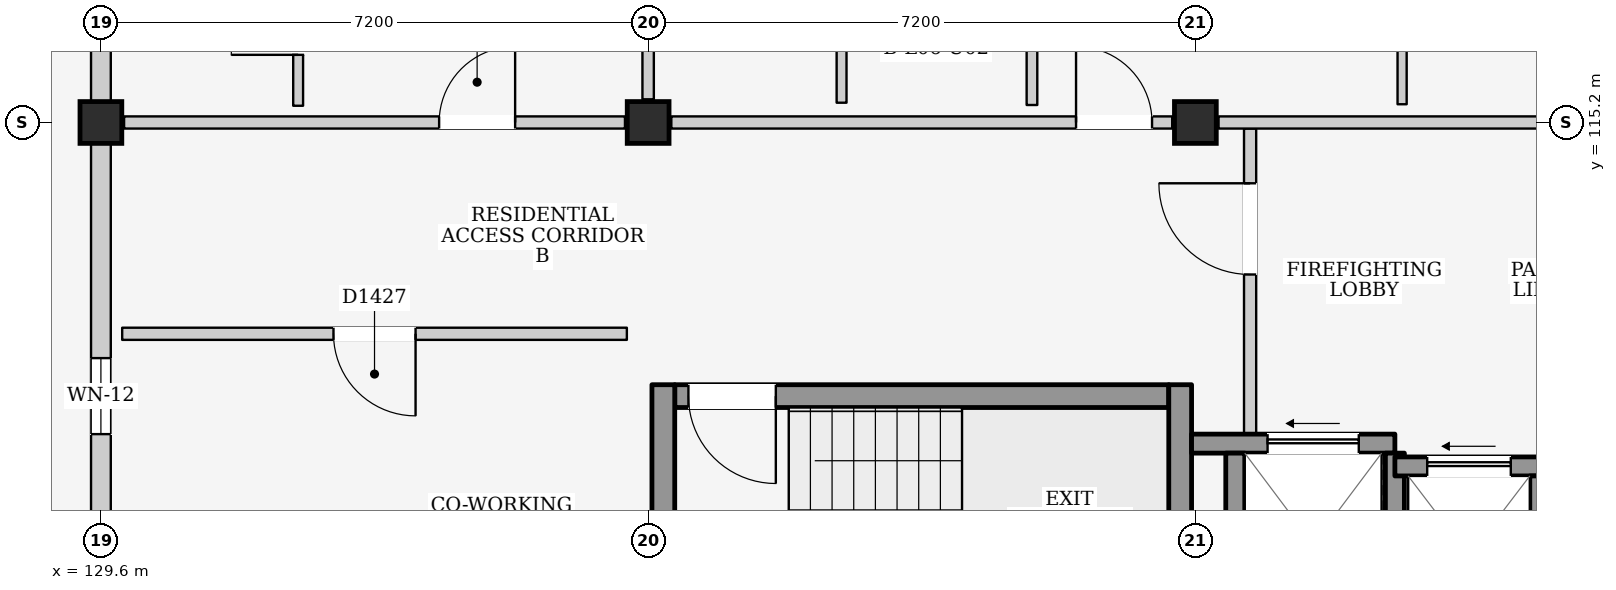
"""IFC4 building model, lengths in metres.
Left out: names, types, materials, properties, quantities, classifications, styles, units other than length and angle.
Written with IfcOpenShell. Run it as: python <this file> out.ifc"""

import sys

from ifc_helpers import new_model, si_unit, direction, frame, frame_2d, origin, origin_2d, place, context, subcontext, project, spatial, rectangle, extrude, element, fill, save


model = new_model("IFC4")
c1 = context("Model", 3, precision=1e-05, world=origin(), true_north=direction((0.0, 1.0)))
c2 = subcontext(c1, "Body", "Model", "MODEL_VIEW")
j1 = project(units=[si_unit("LENGTHUNIT", "METRE"), si_unit("PLANEANGLEUNIT", "RADIAN")], contexts=[c1])
p1 = place(None, origin())
s1 = spatial("IfcSite", under=j1, at=p1, CompositionType="ELEMENT")
p2 = place(p1, origin())
s2 = spatial("IfcBuilding", under=s1, at=p2, CompositionType="ELEMENT")
p3 = place(p2, frame((0.0, 0.0, 21.9)))
s3 = spatial("IfcBuildingStorey", under=s2, at=p3, CompositionType="ELEMENT", Elevation=21.9)
for number, where, z_axis, x_axis in (
    (1, (129.6, 115.2, 0.0), (0.0, 0.0, 1.0), (1.0, 0.0, 0.0)),
    (2, (136.8, 115.2, 0.0), (0.0, 0.0, 1.0), (1.0, 0.0, 0.0)),
    (3, (144.0, 115.2, 0.0), (0.0, 0.0, 1.0), (1.0, 0.0, 0.0)),
):
    element("IfcColumn", number, at=place(p3, frame(where, z_axis=z_axis, x_axis=x_axis)), inside=s3, PredefinedType="COLUMN", context=c2, shape_type="SweptSolid", body=[
        extrude(rectangle(XDim=0.55, YDim=0.55, at=origin_2d()), origin(), (0.0, 0.0, 1.0), 3.2),
    ])
p4 = place(p3, frame((129.6, 108.275, 0.0), z_axis=(0.0, 0.0, 1.0), x_axis=(0.0, 1.0, 0.0)))
e4 = element("IfcWall", 4, at=p4, inside=s3, PredefinedType="ELEMENTEDWALL", context=c2, shape_type="SweptSolid", body=[
    extrude(rectangle(XDim=6.65, YDim=0.26, at=frame_2d((3.325, 0.0))), origin(), (0.0, 0.0, 1.0), 2.465),
])
p5 = place(p4, frame((2.825, 0.0, 1.1)))
e5 = element("IfcOpeningElement", 5, at=p5, cuts=e4, PredefinedType="OPENING", context=c2, shape_type="SweptSolid", body=[
    extrude(rectangle(XDim=1.0, YDim=0.9, at=frame_2d((0.5, 0.45))), frame((0.0, 0.145, 0.0), z_axis=(0.0, -1.0, 0.0), x_axis=(1.0, 0.0, 0.0)), (0.0, 0.0, 1.0), 0.29),
])
p6 = place(p3, frame((129.6, 115.475, 0.0), z_axis=(0.0, 0.0, 1.0), x_axis=(0.0, 1.0, 0.0)))
e6 = element("IfcWall", 6, at=p6, inside=s3, PredefinedType="ELEMENTEDWALL", context=c2, shape_type="SweptSolid", body=[
    extrude(rectangle(XDim=6.65, YDim=0.26, at=frame_2d((3.325, 0.0))), origin(), (0.0, 0.0, 1.0), 2.465),
])
p7 = place(p6, frame((3.6, 0.0, 0.0)))
e7 = element("IfcOpeningElement", 7, at=p7, cuts=e6, PredefinedType="OPENING", context=c2, shape_type="SweptSolid", body=[
    extrude(rectangle(XDim=1.08, YDim=2.12, at=frame_2d((0.54, 1.06))), frame((0.0, 0.145, 0.0), z_axis=(0.0, -1.0, 0.0), x_axis=(1.0, 0.0, 0.0)), (0.0, 0.0, 1.0), 0.29),
])
p8 = place(p6, frame((0.9, 0.0, 0.95)))
e8 = element("IfcOpeningElement", 8, at=p8, cuts=e6, PredefinedType="OPENING", context=c2, shape_type="SweptSolid", body=[
    extrude(rectangle(XDim=1.2, YDim=1.35, at=frame_2d((0.6, 0.675))), frame((0.0, 0.145, 0.0), z_axis=(0.0, -1.0, 0.0), x_axis=(1.0, 0.0, 0.0)), (0.0, 0.0, 1.0), 0.29),
])
p9 = place(p3, frame((137.15, 111.6, 0.0), z_axis=(0.0, 0.0, 1.0), x_axis=(1.0, 0.0, 0.0)))
e9 = element("IfcWall", 9, at=p9, inside=s3, PredefinedType="SHEAR", context=c2, shape_type="SweptSolid", body=[
    extrude(rectangle(XDim=6.5, YDim=0.3, at=frame_2d((3.25, 0.0))), origin(), (0.0, 0.0, 1.0), 2.98),
])
p10 = place(p9, frame((0.18, 0.0, 0.0)))
e10 = element("IfcOpeningElement", 10, at=p10, cuts=e9, PredefinedType="OPENING", context=c2, shape_type="SweptSolid", body=[
    extrude(rectangle(XDim=1.15, YDim=2.2, at=frame_2d((0.575, 1.1))), frame((0.0, 0.165, 0.0), z_axis=(0.0, -1.0, 0.0), x_axis=(1.0, 0.0, 0.0)), (0.0, 0.0, 1.0), 0.33),
])
for number, where, z_axis, x_axis in (
    (11, (137.0, 108.15, 0.0), (0.0, 0.0, 1.0), (0.0, 1.0, 0.0)),
    (12, (143.8, 108.15, 0.0), (0.0, 0.0, 1.0), (0.0, 1.0, 0.0)),
):
    element("IfcWall", number, at=place(p3, frame(where, z_axis=z_axis, x_axis=x_axis)), inside=s3, PredefinedType="SHEAR", context=c2, shape_type="SweptSolid", body=[
        extrude(rectangle(XDim=3.6, YDim=0.3, at=frame_2d((1.8, 0.0))), origin(), (0.0, 0.0, 1.0), 2.98),
    ])
p11 = place(p3, frame((144.72, 111.1, 0.0), z_axis=(0.0, 0.0, 1.0), x_axis=(0.0, 1.0, 0.0)))
e13 = element("IfcWall", 13, at=p11, inside=s3, PredefinedType="PARTITIONING", context=c2, shape_type="SweptSolid", body=[
    extrude(rectangle(XDim=4.02, YDim=0.16, at=frame_2d((2.01, 0.0))), origin(), (0.0, 0.0, 1.0), 2.98),
])
p12 = place(p11, frame((2.1, 0.0, 0.0)))
e14 = element("IfcOpeningElement", 14, at=p12, cuts=e13, PredefinedType="OPENING", context=c2, shape_type="SweptSolid", body=[
    extrude(rectangle(XDim=1.2, YDim=2.2, at=frame_2d((0.6, 1.1))), frame((0.0, 0.095, 0.0), z_axis=(0.0, -1.0, 0.0), x_axis=(1.0, 0.0, 0.0)), (0.0, 0.0, 1.0), 0.19),
])
p13 = place(p3, frame((143.95, 110.975, 0.0), z_axis=(0.0, 0.0, 1.0), x_axis=(1.0, 0.0, 0.0)))
e15 = element("IfcWall", 15, at=p13, inside=s3, PredefinedType="SHEAR", context=c2, shape_type="SweptSolid", body=[
    extrude(rectangle(XDim=2.675, YDim=0.25, at=frame_2d((1.337, 0.0))), origin(), (0.0, 0.0, 1.0), 2.98),
])
p14 = place(p13, frame((1.0, 0.0, 0.0)))
e16 = element("IfcOpeningElement", 16, at=p14, cuts=e15, PredefinedType="OPENING", context=c2, shape_type="SweptSolid", body=[
    extrude(rectangle(XDim=1.2, YDim=2.25, at=frame_2d((0.6, 1.125))), frame((0.0, 0.14, 0.0), z_axis=(0.0, -1.0, 0.0), x_axis=(1.0, 0.0, 0.0)), (0.0, 0.0, 1.0), 0.28),
])
for number, where, z_axis, x_axis in (
    (17, (144.525, 108.45, 0.0), (0.0, 0.0, 1.0), (0.0, 1.0, 0.0)),
    (18, (146.625, 108.45, 0.0), (0.0, 0.0, 1.0), (0.0, 1.0, 0.0)),
):
    element("IfcWall", number, at=place(p3, frame(where, z_axis=z_axis, x_axis=x_axis)), inside=s3, PredefinedType="SHEAR", context=c2, shape_type="SweptSolid", body=[
        extrude(rectangle(XDim=2.4, YDim=0.25, at=frame_2d((1.2, 0.0))), origin(), (0.0, 0.0, 1.0), 2.98),
    ])
p15 = place(p3, frame((146.625, 110.675, 0.0), z_axis=(0.0, 0.0, 1.0), x_axis=(1.0, 0.0, 0.0)))
e19 = element("IfcWall", 19, at=p15, inside=s3, PredefinedType="SHEAR", context=c2, shape_type="SweptSolid", body=[
    extrude(rectangle(XDim=2.025, YDim=0.25, at=frame_2d((1.012, 0.0))), origin(), (0.0, 0.0, 1.0), 2.98),
])
p16 = place(p15, frame((0.425, 0.0, 0.0)))
e20 = element("IfcOpeningElement", 20, at=p16, cuts=e19, PredefinedType="OPENING", context=c2, shape_type="SweptSolid", body=[
    extrude(rectangle(XDim=1.1, YDim=2.15, at=frame_2d((0.55, 1.075))), frame((0.0, 0.14, 0.0), z_axis=(0.0, -1.0, 0.0), x_axis=(1.0, 0.0, 0.0)), (0.0, 0.0, 1.0), 0.28),
])
p17 = place(p3, frame((148.525, 108.45, 0.0), z_axis=(0.0, 0.0, 1.0), x_axis=(0.0, 1.0, 0.0)))
e21 = element("IfcWall", 21, at=p17, inside=s3, PredefinedType="SHEAR", context=c2, shape_type="SweptSolid", body=[
    extrude(rectangle(XDim=2.1, YDim=0.25, at=frame_2d((1.05, 0.0))), origin(), (0.0, 0.0, 1.0), 2.98),
])
p18 = place(p3, frame((129.905, 115.2, 0.0), z_axis=(0.0, 0.0, 1.0), x_axis=(1.0, 0.0, 0.0)))
e22 = element("IfcWall", 22, at=p18, inside=s3, PredefinedType="PARTITIONING", context=c2, shape_type="SweptSolid", body=[
    extrude(rectangle(XDim=6.59, YDim=0.16, at=frame_2d((3.295, 0.0))), origin(), (0.0, 0.0, 1.0), 2.365),
])
p19 = place(p18, frame((4.145, 0.0, 0.0)))
e23 = element("IfcOpeningElement", 23, at=p19, cuts=e22, PredefinedType="OPENING", context=c2, shape_type="SweptSolid", body=[
    extrude(rectangle(XDim=1.0, YDim=2.15, at=frame_2d((0.5, 1.075))), frame((0.0, 0.095, 0.0), z_axis=(0.0, -1.0, 0.0), x_axis=(1.0, 0.0, 0.0)), (0.0, 0.0, 1.0), 0.19),
])
p20 = place(p3, frame((136.8, 115.505, 0.0), z_axis=(0.0, 0.0, 1.0), x_axis=(0.0, 1.0, 0.0)))
e24 = element("IfcWall", 24, at=p20, inside=s3, PredefinedType="PARTITIONING", context=c2, shape_type="SweptSolid", body=[
    extrude(rectangle(XDim=6.59, YDim=0.15, at=frame_2d((3.295, 0.0))), origin(), (0.0, 0.0, 1.0), 2.465),
])
p21 = place(p3, frame((132.195, 115.42, 0.0), z_axis=(0.0, 0.0, 1.0), x_axis=(0.0, 1.0, 0.0)))
e25 = element("IfcWall", 25, at=p21, inside=s3, PredefinedType="PARTITIONING", context=c2, shape_type="SweptSolid", body=[
    extrude(rectangle(XDim=2.22, YDim=0.13, at=frame_2d((1.11, 0.0))), origin(), (0.0, 0.0, 1.0), 2.98),
])
p22 = place(p21, frame((0.67, 0.0, 0.0)))
e26 = element("IfcOpeningElement", 26, at=p22, cuts=e25, PredefinedType="OPENING", context=c2, shape_type="SweptSolid", body=[
    extrude(rectangle(XDim=0.88, YDim=2.1, at=frame_2d((0.44, 1.05))), frame((0.0, 0.08, 0.0), z_axis=(0.0, -1.0, 0.0), x_axis=(1.0, 0.0, 0.0)), (0.0, 0.0, 1.0), 0.16),
])
p23 = place(p3, frame((137.105, 115.2, 0.0), z_axis=(0.0, 0.0, 1.0), x_axis=(1.0, 0.0, 0.0)))
e27 = element("IfcWall", 27, at=p23, inside=s3, PredefinedType="PARTITIONING", context=c2, shape_type="SweptSolid", body=[
    extrude(rectangle(XDim=6.59, YDim=0.16, at=frame_2d((3.295, 0.0))), origin(), (0.0, 0.0, 1.0), 2.365),
])
p24 = place(p23, frame((5.325, 0.0, 0.0)))
e28 = element("IfcOpeningElement", 28, at=p24, cuts=e27, PredefinedType="OPENING", context=c2, shape_type="SweptSolid", body=[
    extrude(rectangle(XDim=1.0, YDim=2.15, at=frame_2d((0.5, 1.075))), frame((0.0, 0.095, 0.0), z_axis=(0.0, -1.0, 0.0), x_axis=(1.0, 0.0, 0.0)), (0.0, 0.0, 1.0), 0.19),
])
p25 = place(p3, frame((144.305, 115.2, 0.0), z_axis=(0.0, 0.0, 1.0), x_axis=(1.0, 0.0, 0.0)))
e29 = element("IfcWall", 29, at=p25, inside=s3, PredefinedType="PARTITIONING", context=c2, shape_type="SweptSolid", body=[
    extrude(rectangle(XDim=6.59, YDim=0.16, at=frame_2d((3.295, 0.0))), origin(), (0.0, 0.0, 1.0), 2.365),
])
p26 = place(p3, frame((139.345, 115.46, 0.0), z_axis=(0.0, 0.0, 1.0), x_axis=(0.0, 1.0, 0.0)))
e30 = element("IfcWall", 30, at=p26, inside=s3, PredefinedType="PARTITIONING", context=c2, shape_type="SweptSolid", body=[
    extrude(rectangle(XDim=3.04, YDim=0.13, at=frame_2d((1.52, 0.0))), origin(), (0.0, 0.0, 1.0), 2.98),
])
p27 = place(p3, frame((141.85, 115.43, 0.0), z_axis=(0.0, 0.0, 1.0), x_axis=(0.0, 1.0, 0.0)))
e31 = element("IfcWall", 31, at=p27, inside=s3, PredefinedType="PARTITIONING", context=c2, shape_type="SweptSolid", body=[
    extrude(rectangle(XDim=3.06, YDim=0.14, at=frame_2d((1.53, 0.0))), origin(), (0.0, 0.0, 1.0), 2.98),
])
p28 = place(p3, frame((146.72, 115.44, 0.0), z_axis=(0.0, 0.0, 1.0), x_axis=(0.0, 1.0, 0.0)))
e32 = element("IfcWall", 32, at=p28, inside=s3, PredefinedType="PARTITIONING", context=c2, shape_type="SweptSolid", body=[
    extrude(rectangle(XDim=3.04, YDim=0.12, at=frame_2d((1.52, 0.0))), origin(), (0.0, 0.0, 1.0), 2.98),
])
p29 = place(p28, frame((1.04, 0.0, 0.0)))
e33 = element("IfcOpeningElement", 33, at=p29, cuts=e32, PredefinedType="OPENING", context=c2, shape_type="SweptSolid", body=[
    extrude(rectangle(XDim=0.96, YDim=2.15, at=frame_2d((0.48, 1.075))), frame((0.0, 0.075, 0.0), z_axis=(0.0, -1.0, 0.0), x_axis=(1.0, 0.0, 0.0)), (0.0, 0.0, 1.0), 0.15),
])
p30 = place(p3, frame((129.88, 112.42, 0.0), z_axis=(0.0, 0.0, 1.0), x_axis=(1.0, 0.0, 0.0)))
e34 = element("IfcWall", 34, at=p30, inside=s3, PredefinedType="PARTITIONING", context=c2, shape_type="SweptSolid", body=[
    extrude(rectangle(XDim=6.64, YDim=0.16, at=frame_2d((3.32, 0.0))), origin(), (0.0, 0.0, 1.0), 2.98),
])
p31 = place(p30, frame((2.78, 0.0, 0.0)))
e35 = element("IfcOpeningElement", 35, at=p31, cuts=e34, PredefinedType="OPENING", context=c2, shape_type="SweptSolid", body=[
    extrude(rectangle(XDim=1.08, YDim=2.22, at=frame_2d((0.54, 1.11))), frame((0.0, 0.095, 0.0), z_axis=(0.0, -1.0, 0.0), x_axis=(1.0, 0.0, 0.0)), (0.0, 0.0, 1.0), 0.19),
])
p32 = place(p5, origin())
e36 = element("IfcWindow", 36, at=p32, inside=s3, PartitioningType="SINGLE_PANEL", PredefinedType="WINDOW", context=c2, shape_type="SweptSolid", body=[
    extrude(rectangle(XDim=1.0, YDim=0.9, at=frame_2d((0.5, 0.45))), frame((0.0, 0.03, 0.0), z_axis=(0.0, -1.0, 0.0), x_axis=(1.0, 0.0, 0.0)), (0.0, 0.0, 1.0), 0.06),
])
fill(e5, e36)
p33 = place(p10, frame((1.15, 0.0, 0.0), z_axis=(0.0, 0.0, 1.0), x_axis=(-1.0, 0.0, 0.0)))
e37 = element("IfcDoor", 37, at=p33, inside=s3, OperationType="SINGLE_SWING_LEFT", PredefinedType="DOOR", context=c2, shape_type="SweptSolid", body=[
    extrude(rectangle(XDim=1.15, YDim=2.2, at=frame_2d((0.575, 1.1))), frame((0.0, 0.025, 0.0), z_axis=(0.0, -1.0, 0.0), x_axis=(1.0, 0.0, 0.0)), (0.0, 0.0, 1.0), 0.05),
])
fill(e10, e37)
p34 = place(p12, origin())
e38 = element("IfcDoor", 38, at=p34, inside=s3, OperationType="SINGLE_SWING_RIGHT", PredefinedType="DOOR", context=c2, shape_type="SweptSolid", body=[
    extrude(rectangle(XDim=1.2, YDim=2.2, at=frame_2d((0.6, 1.1))), frame((0.0, 0.025, 0.0), z_axis=(0.0, -1.0, 0.0), x_axis=(1.0, 0.0, 0.0)), (0.0, 0.0, 1.0), 0.05),
])
fill(e14, e38)
p35 = place(p14, origin())
e39 = element("IfcDoor", 39, at=p35, inside=s3, OperationType="SLIDING_TO_LEFT", PredefinedType="DOOR", context=c2, shape_type="SweptSolid", body=[
    extrude(rectangle(XDim=1.2, YDim=2.25, at=frame_2d((0.6, 1.125))), frame((0.0, 0.025, 0.0), z_axis=(0.0, -1.0, 0.0), x_axis=(1.0, 0.0, 0.0)), (0.0, 0.0, 1.0), 0.05),
])
fill(e16, e39)
p36 = place(p16, origin())
e40 = element("IfcDoor", 40, at=p36, inside=s3, OperationType="SLIDING_TO_LEFT", PredefinedType="DOOR", context=c2, shape_type="SweptSolid", body=[
    extrude(rectangle(XDim=1.1, YDim=2.15, at=frame_2d((0.55, 1.075))), frame((0.0, 0.025, 0.0), z_axis=(0.0, -1.0, 0.0), x_axis=(1.0, 0.0, 0.0)), (0.0, 0.0, 1.0), 0.05),
])
fill(e20, e40)
p37 = place(p19, origin())
e41 = element("IfcDoor", 41, at=p37, inside=s3, OperationType="SINGLE_SWING_RIGHT", PredefinedType="DOOR", context=c2, shape_type="SweptSolid", body=[
    extrude(rectangle(XDim=1.0, YDim=2.15, at=frame_2d((0.5, 1.075))), frame((0.0, 0.025, 0.0), z_axis=(0.0, -1.0, 0.0), x_axis=(1.0, 0.0, 0.0)), (0.0, 0.0, 1.0), 0.05),
])
fill(e23, e41)
p38 = place(p22, origin())
e42 = element("IfcDoor", 42, at=p38, inside=s3, OperationType="SINGLE_SWING_LEFT", PredefinedType="DOOR", context=c2, shape_type="SweptSolid", body=[
    extrude(rectangle(XDim=0.88, YDim=2.1, at=frame_2d((0.44, 1.05))), frame((0.0, 0.025, 0.0), z_axis=(0.0, -1.0, 0.0), x_axis=(1.0, 0.0, 0.0)), (0.0, 0.0, 1.0), 0.05),
])
fill(e26, e42)
p39 = place(p24, origin())
e43 = element("IfcDoor", 43, at=p39, inside=s3, OperationType="SINGLE_SWING_LEFT", PredefinedType="DOOR", context=c2, shape_type="SweptSolid", body=[
    extrude(rectangle(XDim=1.0, YDim=2.15, at=frame_2d((0.5, 1.075))), frame((0.0, 0.025, 0.0), z_axis=(0.0, -1.0, 0.0), x_axis=(1.0, 0.0, 0.0)), (0.0, 0.0, 1.0), 0.05),
])
fill(e28, e43)
p40 = place(p31, frame((1.08, 0.0, 0.0), z_axis=(0.0, 0.0, 1.0), x_axis=(-1.0, 0.0, 0.0)))
e44 = element("IfcDoor", 44, at=p40, inside=s3, OperationType="SINGLE_SWING_LEFT", PredefinedType="DOOR", context=c2, shape_type="SweptSolid", body=[
    extrude(rectangle(XDim=1.08, YDim=2.22, at=frame_2d((0.54, 1.11))), frame((0.0, 0.025, 0.0), z_axis=(0.0, -1.0, 0.0), x_axis=(1.0, 0.0, 0.0)), (0.0, 0.0, 1.0), 0.05),
])
fill(e35, e44)
save(model, sys.argv[1])
